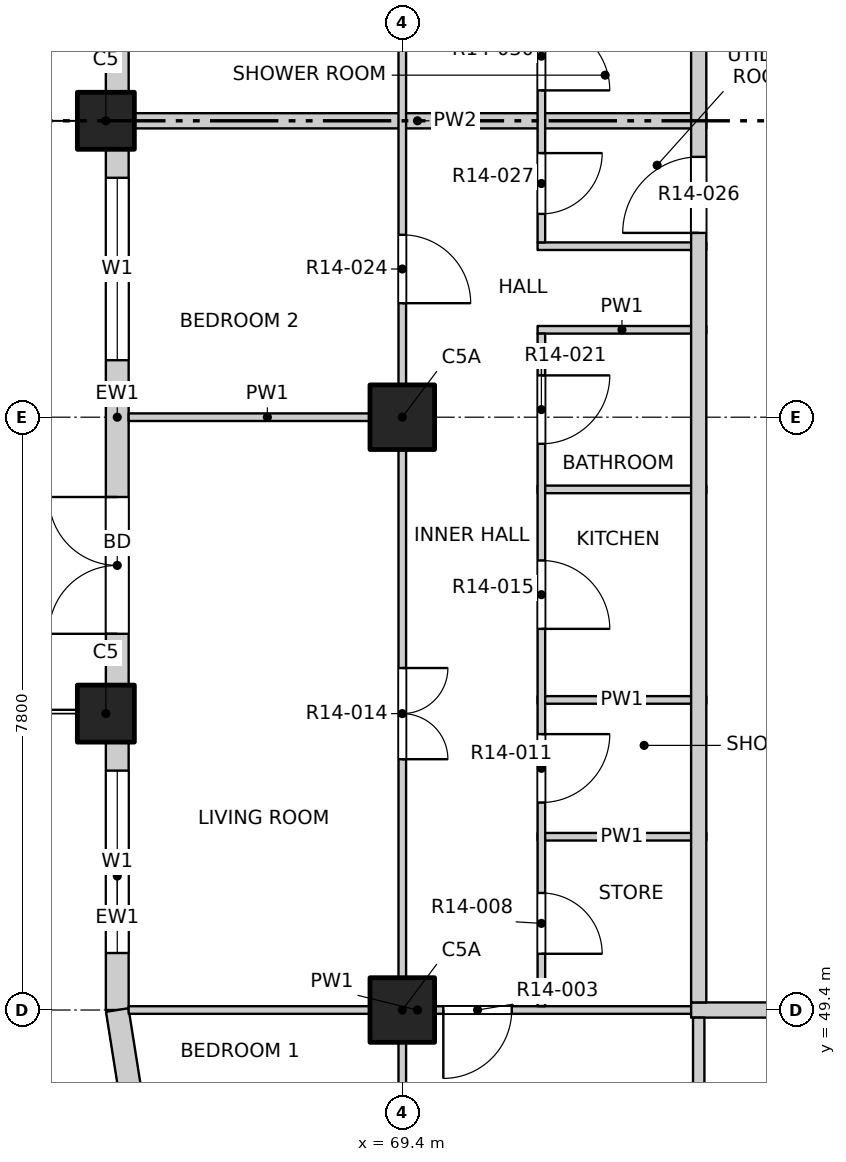
"""IFC4 building model, lengths in metres.
Left out: names, types, materials, properties, quantities, classifications, styles, units other than length and angle.
Written with IfcOpenShell. Run it as: python <this file> out.ifc"""

import sys

from ifc_helpers import new_model, si_unit, direction, frame, frame_2d, origin, origin_2d, place, context, subcontext, project, spatial, rectangle, extrude, element, fill, save


model = new_model("IFC4")
c1 = context("Model", 3, precision=1e-05, world=origin(), true_north=direction((0.0, 1.0)))
c2 = subcontext(c1, "Body", "Model", "MODEL_VIEW")
j1 = project(units=[si_unit("LENGTHUNIT", "METRE"), si_unit("PLANEANGLEUNIT", "RADIAN")], contexts=[c1])
p1 = place(None, origin())
s1 = spatial("IfcSite", under=j1, at=p1, CompositionType="ELEMENT")
p2 = place(p1, origin())
s2 = spatial("IfcBuilding", under=s1, at=p2, CompositionType="ELEMENT")
p3 = place(p2, frame((0.0, 0.0, 152.0)))
s3 = spatial("IfcBuildingStorey", under=s2, at=p3, CompositionType="ELEMENT", Elevation=152.0)
for number, where, z_axis, x_axis in (
    (1, (65.5, 53.3, -0.25), (0.0, 0.0, 1.0), (1.0, 0.0, 0.0)),
    (2, (65.5, 61.1, -0.25), (0.0, 0.0, 1.0), (1.0, 0.0, 0.0)),
):
    element("IfcColumn", number, at=place(p3, frame(where, z_axis=z_axis, x_axis=x_axis)), inside=s3, PredefinedType="COLUMN", context=c2, shape_type="SweptSolid", body=[
        extrude(rectangle(XDim=0.75, YDim=0.75, at=origin_2d()), origin(), (0.0, 0.0, 1.0), 3.4),
    ])
for number, where, z_axis, x_axis in (
    (3, (69.4, 49.4, -0.25), (0.0, 0.0, 1.0), (1.0, 0.0, 0.0)),
    (4, (69.4, 57.2, -0.25), (0.0, 0.0, 1.0), (1.0, 0.0, 0.0)),
):
    element("IfcColumn", number, at=place(p3, frame(where, z_axis=z_axis, x_axis=x_axis)), inside=s3, PredefinedType="COLUMN", context=c2, shape_type="SweptSolid", body=[
        extrude(rectangle(XDim=0.85, YDim=0.85, at=origin_2d()), origin(), (0.0, 0.0, 1.0), 3.4),
    ])
p4 = place(p3, frame((65.65, 49.4, 0.0), z_axis=(0.0, 0.0, 1.0), x_axis=(0.0, 1.0, 0.0)))
e5 = element("IfcWall", 5, at=p4, inside=s3, PredefinedType="SOLIDWALL", context=c2, shape_type="SweptSolid", body=[
    extrude(rectangle(XDim=3.525, YDim=0.3, at=frame_2d((1.763, 0.0))), origin(), (0.0, 0.0, 1.0), 2.7),
])
p5 = place(p4, frame((0.75, 0.0, 0.9)))
e6 = element("IfcOpeningElement", 6, at=p5, cuts=e5, PredefinedType="OPENING", context=c2, shape_type="SweptSolid", body=[
    extrude(rectangle(XDim=2.4, YDim=1.8, at=frame_2d((1.2, 0.9))), frame((0.0, 0.16, 0.0), z_axis=(0.0, -1.0, 0.0), x_axis=(1.0, 0.0, 0.0)), (0.0, 0.0, 1.0), 0.32),
])
p6 = place(p3, frame((65.65, 53.675, 0.0), z_axis=(0.0, 0.0, 1.0), x_axis=(0.0, 1.0, 0.0)))
e7 = element("IfcWall", 7, at=p6, inside=s3, PredefinedType="SOLIDWALL", context=c2, shape_type="SweptSolid", body=[
    extrude(rectangle(XDim=7.05, YDim=0.3, at=frame_2d((3.525, 0.0))), origin(), (0.0, 0.0, 1.0), 2.7),
])
p7 = place(p6, frame((0.675, 0.0, 0.0)))
e8 = element("IfcOpeningElement", 8, at=p7, cuts=e7, PredefinedType="OPENING", context=c2, shape_type="SweptSolid", body=[
    extrude(rectangle(XDim=1.8, YDim=2.4, at=frame_2d((0.9, 1.2))), frame((0.0, 0.16, 0.0), z_axis=(0.0, -1.0, 0.0), x_axis=(1.0, 0.0, 0.0)), (0.0, 0.0, 1.0), 0.32),
])
p8 = place(p6, frame((4.275, 0.0, 0.9)))
e9 = element("IfcOpeningElement", 9, at=p8, cuts=e7, PredefinedType="OPENING", context=c2, shape_type="SweptSolid", body=[
    extrude(rectangle(XDim=2.4, YDim=1.8, at=frame_2d((1.2, 0.9))), frame((0.0, 0.16, 0.0), z_axis=(0.0, -1.0, 0.0), x_axis=(1.0, 0.0, 0.0)), (0.0, 0.0, 1.0), 0.32),
])
p9 = place(p3, frame((65.65, 61.475, 0.0), z_axis=(0.0, 0.0, 1.0), x_axis=(0.0, 1.0, 0.0)))
e10 = element("IfcWall", 10, at=p9, inside=s3, PredefinedType="SOLIDWALL", context=c2, shape_type="SweptSolid", body=[
    extrude(rectangle(XDim=7.05, YDim=0.3, at=frame_2d((3.525, 0.0))), origin(), (0.0, 0.0, 1.0), 2.7),
])
p10 = place(p9, frame((0.675, 0.0, 0.0)))
e11 = element("IfcOpeningElement", 11, at=p10, cuts=e10, PredefinedType="OPENING", context=c2, shape_type="SweptSolid", body=[
    extrude(rectangle(XDim=1.8, YDim=2.4, at=frame_2d((0.9, 1.2))), frame((0.0, 0.16, 0.0), z_axis=(0.0, -1.0, 0.0), x_axis=(1.0, 0.0, 0.0)), (0.0, 0.0, 1.0), 0.32),
])
p11 = place(p9, frame((4.275, 0.0, 0.9)))
e12 = element("IfcOpeningElement", 12, at=p11, cuts=e10, PredefinedType="OPENING", context=c2, shape_type="SweptSolid", body=[
    extrude(rectangle(XDim=2.4, YDim=1.8, at=frame_2d((1.2, 0.9))), frame((0.0, 0.16, 0.0), z_axis=(0.0, -1.0, 0.0), x_axis=(1.0, 0.0, 0.0)), (0.0, 0.0, 1.0), 0.32),
])
p12 = place(p3, frame((65.65, 49.4, 0.0), z_axis=(0.0, 0.0, 1.0), x_axis=(0.156496880861, -0.987678452879, 0.0)))
e13 = element("IfcWall", 13, at=p12, inside=s3, PredefinedType="SOLIDWALL", context=c2, shape_type="SweptSolid", body=[
    extrude(rectangle(XDim=1.173, YDim=0.3, at=frame_2d((0.586, 0.0))), origin(), (0.0, 0.0, 1.0), 2.7),
])
p13 = place(p3, frame((65.8, 49.4, 0.0), z_axis=(0.0, 0.0, 1.0), x_axis=(1.0, 0.0, 0.0)))
e14 = element("IfcWall", 14, at=p13, inside=s3, PredefinedType="PARTITIONING", context=c2, shape_type="SweptSolid", body=[
    extrude(rectangle(XDim=7.6, YDim=0.1, at=frame_2d((3.8, 0.0))), origin(), (0.0, 0.0, 1.0), 3.15),
])
p14 = place(p13, frame((4.14, 0.0, 0.0)))
e15 = element("IfcOpeningElement", 15, at=p14, cuts=e14, PredefinedType="OPENING", context=c2, shape_type="SweptSolid", body=[
    extrude(rectangle(XDim=0.9, YDim=2.1, at=frame_2d((0.45, 1.05))), frame((0.0, 0.06, 0.0), z_axis=(0.0, -1.0, 0.0), x_axis=(1.0, 0.0, 0.0)), (0.0, 0.0, 1.0), 0.12),
])
p15 = place(p3, frame((73.2, 49.4, 0.0), z_axis=(0.0, 0.0, 1.0), x_axis=(1.0, 0.0, 0.0)))
e16 = element("IfcWall", 16, at=p15, inside=s3, PredefinedType="PARTITIONING", context=c2, shape_type="SweptSolid", body=[
    extrude(rectangle(XDim=23.6, YDim=0.2, at=frame_2d((11.8, 0.0))), origin(), (0.0, 0.0, 1.0), 3.15),
])
p16 = place(p15, frame((4.525, 0.0, 0.0)))
e17 = element("IfcOpeningElement", 17, at=p16, cuts=e16, PredefinedType="OPENING", context=c2, shape_type="SweptSolid", body=[
    extrude(rectangle(XDim=1.2, YDim=2.1, at=frame_2d((0.6, 1.05))), frame((0.0, 0.11, 0.0), z_axis=(0.0, -1.0, 0.0), x_axis=(1.0, 0.0, 0.0)), (0.0, 0.0, 1.0), 0.22),
])
p17 = place(p15, frame((12.325, 0.0, 0.0)))
e18 = element("IfcOpeningElement", 18, at=p17, cuts=e16, PredefinedType="OPENING", context=c2, shape_type="SweptSolid", body=[
    extrude(rectangle(XDim=1.2, YDim=2.1, at=frame_2d((0.6, 1.05))), frame((0.0, 0.11, 0.0), z_axis=(0.0, -1.0, 0.0), x_axis=(1.0, 0.0, 0.0)), (0.0, 0.0, 1.0), 0.22),
])
p18 = place(p15, frame((20.125, 0.0, 0.0)))
e19 = element("IfcOpeningElement", 19, at=p18, cuts=e16, PredefinedType="OPENING", context=c2, shape_type="SweptSolid", body=[
    extrude(rectangle(XDim=1.2, YDim=2.1, at=frame_2d((0.6, 1.05))), frame((0.0, 0.11, 0.0), z_axis=(0.0, -1.0, 0.0), x_axis=(1.0, 0.0, 0.0)), (0.0, 0.0, 1.0), 0.22),
])
for number, where, z_axis, x_axis in (
    (20, (71.18, 51.68, 0.0), (0.0, 0.0, 1.0), (1.0, 0.0, 0.0)),
    (21, (71.18, 53.48, 0.0), (0.0, 0.0, 1.0), (1.0, 0.0, 0.0)),
    (22, (71.18, 56.25, 0.0), (0.0, 0.0, 1.0), (1.0, 0.0, 0.0)),
):
    element("IfcWall", number, at=place(p3, frame(where, z_axis=z_axis, x_axis=x_axis)), inside=s3, PredefinedType="PARTITIONING", context=c2, shape_type="SweptSolid", body=[
        extrude(rectangle(XDim=2.22, YDim=0.1, at=frame_2d((1.11, 0.0))), origin(), (0.0, 0.0, 1.0), 3.15),
    ])
p19 = place(p3, frame((65.8, 57.2, 0.0), z_axis=(0.0, 0.0, 1.0), x_axis=(1.0, 0.0, 0.0)))
e23 = element("IfcWall", 23, at=p19, inside=s3, PredefinedType="PARTITIONING", context=c2, shape_type="SweptSolid", body=[
    extrude(rectangle(XDim=3.65, YDim=0.1, at=frame_2d((1.825, 0.0))), origin(), (0.0, 0.0, 1.0), 3.15),
])
for number, where, z_axis, x_axis in (
    (24, (71.18, 58.35, 0.0), (0.0, 0.0, 1.0), (1.0, 0.0, 0.0)),
    (25, (71.18, 59.45, 0.0), (0.0, 0.0, 1.0), (1.0, 0.0, 0.0)),
):
    element("IfcWall", number, at=place(p3, frame(where, z_axis=z_axis, x_axis=x_axis)), inside=s3, PredefinedType="PARTITIONING", context=c2, shape_type="SweptSolid", body=[
        extrude(rectangle(XDim=2.22, YDim=0.1, at=frame_2d((1.11, 0.0))), origin(), (0.0, 0.0, 1.0), 3.15),
    ])
p20 = place(p3, frame((65.8, 61.1, 0.0), z_axis=(0.0, 0.0, 1.0), x_axis=(1.0, 0.0, 0.0)))
e26 = element("IfcWall", 26, at=p20, inside=s3, PredefinedType="PARTITIONING", context=c2, shape_type="SweptSolid", body=[
    extrude(rectangle(XDim=7.6, YDim=0.2, at=frame_2d((3.8, 0.0))), origin(), (0.0, 0.0, 1.0), 2.55),
])
p21 = place(p3, frame((69.4, 45.8, 0.0), z_axis=(0.0, 0.0, 1.0), x_axis=(0.0, 1.0, 0.0)))
e27 = element("IfcWall", 27, at=p21, inside=s3, PredefinedType="PARTITIONING", context=c2, shape_type="SweptSolid", body=[
    extrude(rectangle(XDim=38.4, YDim=0.1, at=frame_2d((19.2, 0.0))), origin(), (0.0, 0.0, 1.0), 3.15),
])
p22 = place(p21, frame((1.05, 0.0, 0.0)))
e28 = element("IfcOpeningElement", 28, at=p22, cuts=e27, PredefinedType="OPENING", context=c2, shape_type="SweptSolid", body=[
    extrude(rectangle(XDim=1.2, YDim=2.1, at=frame_2d((0.6, 1.05))), frame((0.0, 0.06, 0.0), z_axis=(0.0, -1.0, 0.0), x_axis=(1.0, 0.0, 0.0)), (0.0, 0.0, 1.0), 0.12),
])
p23 = place(p21, frame((6.9, 0.0, 0.0)))
e29 = element("IfcOpeningElement", 29, at=p23, cuts=e27, PredefinedType="OPENING", context=c2, shape_type="SweptSolid", body=[
    extrude(rectangle(XDim=1.2, YDim=2.1, at=frame_2d((0.6, 1.05))), frame((0.0, 0.06, 0.0), z_axis=(0.0, -1.0, 0.0), x_axis=(1.0, 0.0, 0.0)), (0.0, 0.0, 1.0), 0.12),
])
p24 = place(p21, frame((12.9, 0.0, 0.0)))
e30 = element("IfcOpeningElement", 30, at=p24, cuts=e27, PredefinedType="OPENING", context=c2, shape_type="SweptSolid", body=[
    extrude(rectangle(XDim=0.9, YDim=2.1, at=frame_2d((0.45, 1.05))), frame((0.0, 0.06, 0.0), z_axis=(0.0, -1.0, 0.0), x_axis=(1.0, 0.0, 0.0)), (0.0, 0.0, 1.0), 0.12),
])
p25 = place(p21, frame((16.8, 0.0, 0.0)))
e31 = element("IfcOpeningElement", 31, at=p25, cuts=e27, PredefinedType="OPENING", context=c2, shape_type="SweptSolid", body=[
    extrude(rectangle(XDim=0.9, YDim=2.1, at=frame_2d((0.45, 1.05))), frame((0.0, 0.06, 0.0), z_axis=(0.0, -1.0, 0.0), x_axis=(1.0, 0.0, 0.0)), (0.0, 0.0, 1.0), 0.12),
])
p26 = place(p21, frame((20.7, 0.0, 0.0)))
e32 = element("IfcOpeningElement", 32, at=p26, cuts=e27, PredefinedType="OPENING", context=c2, shape_type="SweptSolid", body=[
    extrude(rectangle(XDim=0.9, YDim=2.1, at=frame_2d((0.45, 1.05))), frame((0.0, 0.06, 0.0), z_axis=(0.0, -1.0, 0.0), x_axis=(1.0, 0.0, 0.0)), (0.0, 0.0, 1.0), 0.12),
])
p27 = place(p21, frame((24.6, 0.0, 0.0)))
e33 = element("IfcOpeningElement", 33, at=p27, cuts=e27, PredefinedType="OPENING", context=c2, shape_type="SweptSolid", body=[
    extrude(rectangle(XDim=0.9, YDim=2.1, at=frame_2d((0.45, 1.05))), frame((0.0, 0.06, 0.0), z_axis=(0.0, -1.0, 0.0), x_axis=(1.0, 0.0, 0.0)), (0.0, 0.0, 1.0), 0.12),
])
p28 = place(p21, frame((28.5, 0.0, 0.0)))
e34 = element("IfcOpeningElement", 34, at=p28, cuts=e27, PredefinedType="OPENING", context=c2, shape_type="SweptSolid", body=[
    extrude(rectangle(XDim=0.9, YDim=2.1, at=frame_2d((0.45, 1.05))), frame((0.0, 0.06, 0.0), z_axis=(0.0, -1.0, 0.0), x_axis=(1.0, 0.0, 0.0)), (0.0, 0.0, 1.0), 0.12),
])
p29 = place(p21, frame((32.4, 0.0, 0.0)))
e35 = element("IfcOpeningElement", 35, at=p29, cuts=e27, PredefinedType="OPENING", context=c2, shape_type="SweptSolid", body=[
    extrude(rectangle(XDim=0.9, YDim=2.1, at=frame_2d((0.45, 1.05))), frame((0.0, 0.06, 0.0), z_axis=(0.0, -1.0, 0.0), x_axis=(1.0, 0.0, 0.0)), (0.0, 0.0, 1.0), 0.12),
])
p30 = place(p21, frame((36.15, 0.0, 0.0)))
e36 = element("IfcOpeningElement", 36, at=p30, cuts=e27, PredefinedType="OPENING", context=c2, shape_type="SweptSolid", body=[
    extrude(rectangle(XDim=1.2, YDim=2.1, at=frame_2d((0.6, 1.05))), frame((0.0, 0.06, 0.0), z_axis=(0.0, -1.0, 0.0), x_axis=(1.0, 0.0, 0.0)), (0.0, 0.0, 1.0), 0.12),
])
p31 = place(p3, frame((71.23, 49.45, 0.0), z_axis=(0.0, 0.0, 1.0), x_axis=(0.0, 1.0, 0.0)))
e37 = element("IfcWall", 37, at=p31, inside=s3, PredefinedType="PARTITIONING", context=c2, shape_type="SweptSolid", body=[
    extrude(rectangle(XDim=8.85, YDim=0.1, at=frame_2d((4.425, 0.0))), origin(), (0.0, 0.0, 1.0), 3.15),
])
p32 = place(p31, frame((0.69, 0.0, 0.0)))
e38 = element("IfcOpeningElement", 38, at=p32, cuts=e37, PredefinedType="OPENING", context=c2, shape_type="SweptSolid", body=[
    extrude(rectangle(XDim=0.8, YDim=2.1, at=frame_2d((0.4, 1.05))), frame((0.0, 0.06, 0.0), z_axis=(0.0, -1.0, 0.0), x_axis=(1.0, 0.0, 0.0)), (0.0, 0.0, 1.0), 0.12),
])
p33 = place(p31, frame((2.68, 0.0, 0.0)))
e39 = element("IfcOpeningElement", 39, at=p33, cuts=e37, PredefinedType="OPENING", context=c2, shape_type="SweptSolid", body=[
    extrude(rectangle(XDim=0.9, YDim=2.1, at=frame_2d((0.45, 1.05))), frame((0.0, 0.06, 0.0), z_axis=(0.0, -1.0, 0.0), x_axis=(1.0, 0.0, 0.0)), (0.0, 0.0, 1.0), 0.12),
])
p34 = place(p31, frame((4.965, 0.0, 0.0)))
e40 = element("IfcOpeningElement", 40, at=p34, cuts=e37, PredefinedType="OPENING", context=c2, shape_type="SweptSolid", body=[
    extrude(rectangle(XDim=0.9, YDim=2.1, at=frame_2d((0.45, 1.05))), frame((0.0, 0.06, 0.0), z_axis=(0.0, -1.0, 0.0), x_axis=(1.0, 0.0, 0.0)), (0.0, 0.0, 1.0), 0.12),
])
p35 = place(p31, frame((7.4, 0.0, 0.0)))
e41 = element("IfcOpeningElement", 41, at=p35, cuts=e37, PredefinedType="OPENING", context=c2, shape_type="SweptSolid", body=[
    extrude(rectangle(XDim=0.9, YDim=2.1, at=frame_2d((0.45, 1.05))), frame((0.0, 0.06, 0.0), z_axis=(0.0, -1.0, 0.0), x_axis=(1.0, 0.0, 0.0)), (0.0, 0.0, 1.0), 0.12),
])
p36 = place(p3, frame((71.23, 59.5, 0.0), z_axis=(0.0, 0.0, 1.0), x_axis=(0.0, 1.0, 0.0)))
e42 = element("IfcWall", 42, at=p36, inside=s3, PredefinedType="PARTITIONING", context=c2, shape_type="SweptSolid", body=[
    extrude(rectangle(XDim=3.25, YDim=0.1, at=frame_2d((1.625, 0.0))), origin(), (0.0, 0.0, 1.0), 3.15),
])
p37 = place(p36, frame((0.375, 0.0, 0.0)))
e43 = element("IfcOpeningElement", 43, at=p37, cuts=e42, PredefinedType="OPENING", context=c2, shape_type="SweptSolid", body=[
    extrude(rectangle(XDim=0.8, YDim=2.1, at=frame_2d((0.4, 1.05))), frame((0.0, 0.06, 0.0), z_axis=(0.0, -1.0, 0.0), x_axis=(1.0, 0.0, 0.0)), (0.0, 0.0, 1.0), 0.12),
])
p38 = place(p36, frame((2.0, 0.0, 0.0)))
e44 = element("IfcOpeningElement", 44, at=p38, cuts=e42, PredefinedType="OPENING", context=c2, shape_type="SweptSolid", body=[
    extrude(rectangle(XDim=0.9, YDim=2.1, at=frame_2d((0.45, 1.05))), frame((0.0, 0.06, 0.0), z_axis=(0.0, -1.0, 0.0), x_axis=(1.0, 0.0, 0.0)), (0.0, 0.0, 1.0), 0.12),
])
p39 = place(p3, frame((73.3, 45.8, 0.0), z_axis=(0.0, 0.0, 1.0), x_axis=(0.0, 1.0, 0.0)))
e45 = element("IfcWall", 45, at=p39, inside=s3, PredefinedType="PARTITIONING", context=c2, shape_type="SweptSolid", body=[
    extrude(rectangle(XDim=3.5, YDim=0.15, at=frame_2d((1.75, 0.0))), origin(), (0.0, 0.0, 1.0), 3.15),
])
p40 = place(p3, frame((73.3, 49.5, 0.0), z_axis=(0.0, 0.0, 1.0), x_axis=(0.0, 1.0, 0.0)))
e46 = element("IfcWall", 46, at=p40, inside=s3, PredefinedType="PARTITIONING", context=c2, shape_type="SweptSolid", body=[
    extrude(rectangle(XDim=34.7, YDim=0.2, at=frame_2d((17.35, 0.0))), origin(), (0.0, 0.0, 1.0), 3.15),
])
p41 = place(p40, frame((10.125, 0.0, 0.0)))
e47 = element("IfcOpeningElement", 47, at=p41, cuts=e46, PredefinedType="OPENING", context=c2, shape_type="SweptSolid", body=[
    extrude(rectangle(XDim=1.0, YDim=2.1, at=frame_2d((0.5, 1.05))), frame((0.0, 0.11, 0.0), z_axis=(0.0, -1.0, 0.0), x_axis=(1.0, 0.0, 0.0)), (0.0, 0.0, 1.0), 0.22),
])
p42 = place(p40, frame((14.575, 0.0, 0.0)))
e48 = element("IfcOpeningElement", 48, at=p42, cuts=e46, PredefinedType="OPENING", context=c2, shape_type="SweptSolid", body=[
    extrude(rectangle(XDim=1.0, YDim=2.1, at=frame_2d((0.5, 1.05))), frame((0.0, 0.11, 0.0), z_axis=(0.0, -1.0, 0.0), x_axis=(1.0, 0.0, 0.0)), (0.0, 0.0, 1.0), 0.22),
])
p43 = place(p40, frame((26.575, 0.0, 0.0)))
e49 = element("IfcOpeningElement", 49, at=p43, cuts=e46, PredefinedType="OPENING", context=c2, shape_type="SweptSolid", body=[
    extrude(rectangle(XDim=1.0, YDim=2.1, at=frame_2d((0.5, 1.05))), frame((0.0, 0.11, 0.0), z_axis=(0.0, -1.0, 0.0), x_axis=(1.0, 0.0, 0.0)), (0.0, 0.0, 1.0), 0.22),
])
p44 = place(p5, origin())
e50 = element("IfcWindow", 50, at=p44, inside=s3, PartitioningType="DOUBLE_PANEL_VERTICAL", PredefinedType="WINDOW", context=c2, shape_type="SweptSolid", body=[
    extrude(rectangle(XDim=2.4, YDim=1.8, at=frame_2d((1.2, 0.9))), frame((0.0, 0.03, 0.0), z_axis=(0.0, -1.0, 0.0), x_axis=(1.0, 0.0, 0.0)), (0.0, 0.0, 1.0), 0.06),
])
fill(e6, e50)
p45 = place(p7, origin())
e51 = element("IfcDoor", 51, at=p45, inside=s3, OperationType="DOUBLE_DOOR_SINGLE_SWING", PredefinedType="DOOR", context=c2, shape_type="SweptSolid", body=[
    extrude(rectangle(XDim=1.8, YDim=2.4, at=frame_2d((0.9, 1.2))), frame((0.0, 0.025, 0.0), z_axis=(0.0, -1.0, 0.0), x_axis=(1.0, 0.0, 0.0)), (0.0, 0.0, 1.0), 0.05),
])
fill(e8, e51)
p46 = place(p8, origin())
e52 = element("IfcWindow", 52, at=p46, inside=s3, PartitioningType="DOUBLE_PANEL_VERTICAL", PredefinedType="WINDOW", context=c2, shape_type="SweptSolid", body=[
    extrude(rectangle(XDim=2.4, YDim=1.8, at=frame_2d((1.2, 0.9))), frame((0.0, 0.03, 0.0), z_axis=(0.0, -1.0, 0.0), x_axis=(1.0, 0.0, 0.0)), (0.0, 0.0, 1.0), 0.06),
])
fill(e9, e52)
p47 = place(p14, origin())
e53 = element("IfcDoor", 53, at=p47, inside=s3, OperationType="SINGLE_SWING_RIGHT", PredefinedType="DOOR", context=c2, shape_type="SweptSolid", body=[
    extrude(rectangle(XDim=0.9, YDim=2.1, at=frame_2d((0.45, 1.05))), frame((0.0, 0.025, 0.0), z_axis=(0.0, -1.0, 0.0), x_axis=(1.0, 0.0, 0.0)), (0.0, 0.0, 1.0), 0.05),
])
fill(e15, e53)
p48 = place(p32, origin())
e54 = element("IfcDoor", 54, at=p48, inside=s3, OperationType="SINGLE_SWING_RIGHT", PredefinedType="DOOR", context=c2, shape_type="SweptSolid", body=[
    extrude(rectangle(XDim=0.8, YDim=2.1, at=frame_2d((0.4, 1.05))), frame((0.0, 0.025, 0.0), z_axis=(0.0, -1.0, 0.0), x_axis=(1.0, 0.0, 0.0)), (0.0, 0.0, 1.0), 0.05),
])
fill(e38, e54)
p49 = place(p33, origin())
e55 = element("IfcDoor", 55, at=p49, inside=s3, OperationType="SINGLE_SWING_LEFT", PredefinedType="DOOR", context=c2, shape_type="SweptSolid", body=[
    extrude(rectangle(XDim=0.9, YDim=2.1, at=frame_2d((0.45, 1.05))), frame((0.0, 0.025, 0.0), z_axis=(0.0, -1.0, 0.0), x_axis=(1.0, 0.0, 0.0)), (0.0, 0.0, 1.0), 0.05),
])
fill(e39, e55)
p50 = place(p23, origin())
e56 = element("IfcDoor", 56, at=p50, inside=s3, OperationType="DOUBLE_DOOR_SINGLE_SWING", PredefinedType="DOOR", context=c2, shape_type="SweptSolid", body=[
    extrude(rectangle(XDim=1.2, YDim=2.1, at=frame_2d((0.6, 1.05))), frame((0.0, 0.025, 0.0), z_axis=(0.0, -1.0, 0.0), x_axis=(1.0, 0.0, 0.0)), (0.0, 0.0, 1.0), 0.05),
])
fill(e29, e56)
p51 = place(p34, origin())
e57 = element("IfcDoor", 57, at=p51, inside=s3, OperationType="SINGLE_SWING_RIGHT", PredefinedType="DOOR", context=c2, shape_type="SweptSolid", body=[
    extrude(rectangle(XDim=0.9, YDim=2.1, at=frame_2d((0.45, 1.05))), frame((0.0, 0.025, 0.0), z_axis=(0.0, -1.0, 0.0), x_axis=(1.0, 0.0, 0.0)), (0.0, 0.0, 1.0), 0.05),
])
fill(e40, e57)
p52 = place(p35, origin())
e58 = element("IfcDoor", 58, at=p52, inside=s3, OperationType="SINGLE_SWING_LEFT", PredefinedType="DOOR", context=c2, shape_type="SweptSolid", body=[
    extrude(rectangle(XDim=0.9, YDim=2.1, at=frame_2d((0.45, 1.05))), frame((0.0, 0.025, 0.0), z_axis=(0.0, -1.0, 0.0), x_axis=(1.0, 0.0, 0.0)), (0.0, 0.0, 1.0), 0.05),
])
fill(e41, e58)
p53 = place(p24, origin())
e59 = element("IfcDoor", 59, at=p53, inside=s3, OperationType="SINGLE_SWING_RIGHT", PredefinedType="DOOR", context=c2, shape_type="SweptSolid", body=[
    extrude(rectangle(XDim=0.9, YDim=2.1, at=frame_2d((0.45, 1.05))), frame((0.0, 0.025, 0.0), z_axis=(0.0, -1.0, 0.0), x_axis=(1.0, 0.0, 0.0)), (0.0, 0.0, 1.0), 0.05),
])
fill(e30, e59)
p54 = place(p41, origin())
e60 = element("IfcDoor", 60, at=p54, inside=s3, OperationType="SINGLE_SWING_RIGHT", PredefinedType="DOOR", context=c2, shape_type="SweptSolid", body=[
    extrude(rectangle(XDim=1.0, YDim=2.1, at=frame_2d((0.5, 1.05))), frame((0.0, 0.025, 0.0), z_axis=(0.0, -1.0, 0.0), x_axis=(1.0, 0.0, 0.0)), (0.0, 0.0, 1.0), 0.05),
])
fill(e47, e60)
p55 = place(p37, origin())
e61 = element("IfcDoor", 61, at=p55, inside=s3, OperationType="SINGLE_SWING_LEFT", PredefinedType="DOOR", context=c2, shape_type="SweptSolid", body=[
    extrude(rectangle(XDim=0.8, YDim=2.1, at=frame_2d((0.4, 1.05))), frame((0.0, 0.025, 0.0), z_axis=(0.0, -1.0, 0.0), x_axis=(1.0, 0.0, 0.0)), (0.0, 0.0, 1.0), 0.05),
])
fill(e43, e61)
p56 = place(p38, origin())
e62 = element("IfcDoor", 62, at=p56, inside=s3, OperationType="SINGLE_SWING_RIGHT", PredefinedType="DOOR", context=c2, shape_type="SweptSolid", body=[
    extrude(rectangle(XDim=0.9, YDim=2.1, at=frame_2d((0.45, 1.05))), frame((0.0, 0.025, 0.0), z_axis=(0.0, -1.0, 0.0), x_axis=(1.0, 0.0, 0.0)), (0.0, 0.0, 1.0), 0.05),
])
fill(e44, e62)
save(model, sys.argv[1])
